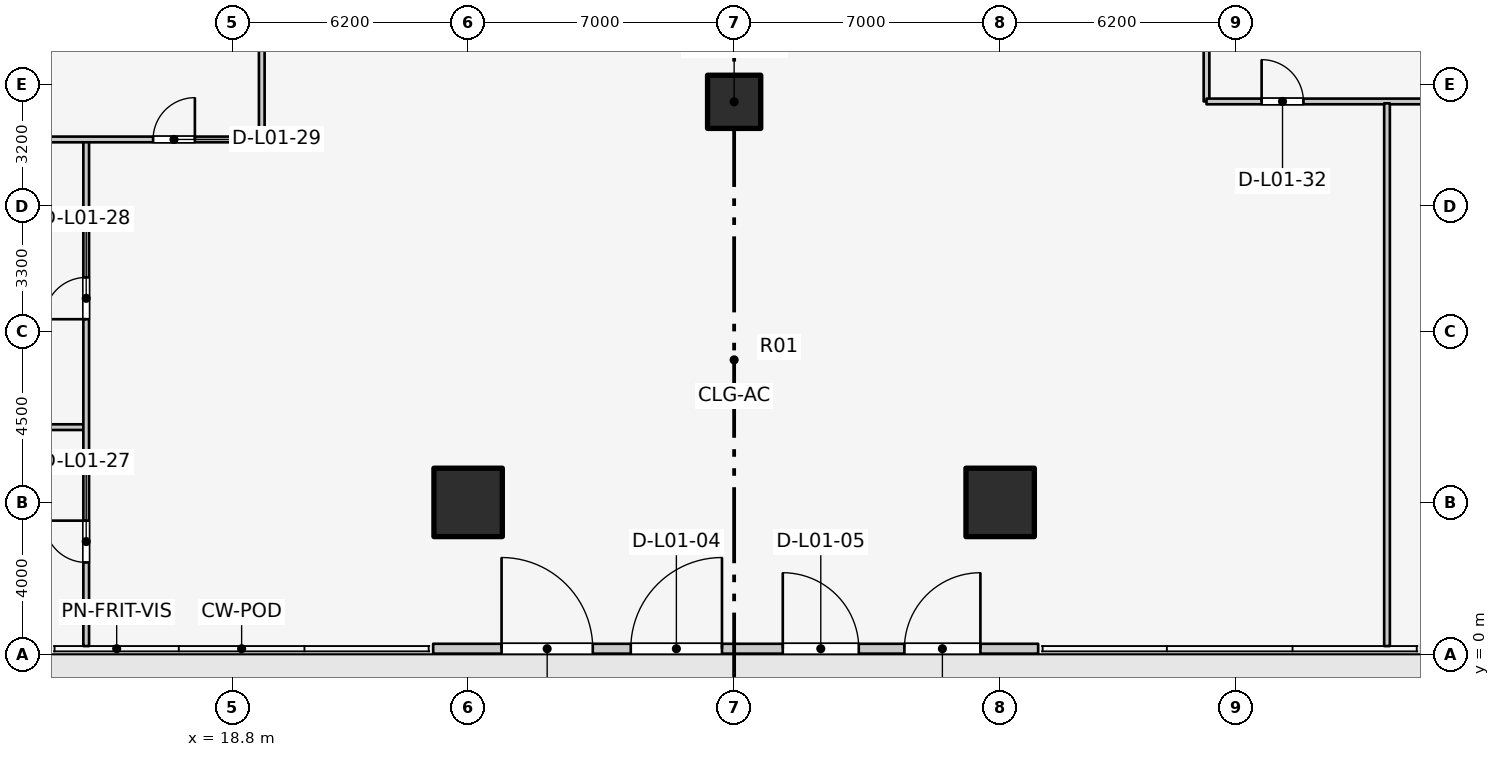
"""IFC4 building model, lengths in metres.
Left out: names, types, materials, properties, quantities, classifications, styles, units other than length and angle.
Written with IfcOpenShell. Run it as: python <this file> out.ifc"""

import sys

from ifc_helpers import new_model, si_unit, direction, frame, frame_2d, origin, origin_2d, place, context, subcontext, project, spatial, rectangle, extrude, element, fill, save


model = new_model("IFC4")
c1 = context("Model", 3, precision=1e-05, world=origin(), true_north=direction((0.0, 1.0)))
c2 = subcontext(c1, "Body", "Model", "MODEL_VIEW")
j1 = project(units=[si_unit("LENGTHUNIT", "METRE"), si_unit("PLANEANGLEUNIT", "RADIAN")], contexts=[c1])
p1 = place(None, origin())
s1 = spatial("IfcSite", under=j1, at=p1, CompositionType="ELEMENT")
p2 = place(p1, origin())
s2 = spatial("IfcBuilding", under=s1, at=p2, CompositionType="ELEMENT")
p3 = place(p2, origin())
s3 = spatial("IfcBuildingStorey", under=s2, at=p3, CompositionType="ELEMENT", Elevation=0.0)
for number, where, z_axis, x_axis in (
    (1, (25.0, 4.0, 0.0), (0.0, 0.0, 1.0), (1.0, 0.0, 0.0)),
    (2, (39.0, 4.0, 0.0), (0.0, 0.0, 1.0), (1.0, 0.0, 0.0)),
):
    element("IfcColumn", number, at=place(p3, frame(where, z_axis=z_axis, x_axis=x_axis)), inside=s3, PredefinedType="COLUMN", context=c2, shape_type="SweptSolid", body=[
        extrude(rectangle(XDim=1.8, YDim=1.8, at=origin_2d()), origin(), (0.0, 0.0, 1.0), 4.6),
    ])
p4 = place(p3, frame((32.0, 14.54, 0.0), z_axis=(0.0, 0.0, 1.0), x_axis=(1.0, 0.0, 0.0)))
e3 = element("IfcColumn", 3, at=p4, inside=s3, PredefinedType="COLUMN", context=c2, shape_type="SweptSolid", body=[
    extrude(rectangle(XDim=1.4, YDim=1.4, at=origin_2d()), origin(), (0.0, 0.0, 1.0), 4.6),
])
p5 = place(p3, frame((24.08, 0.15, 0.0), z_axis=(0.0, 0.0, 1.0), x_axis=(1.0, 0.0, 0.0)))
e4 = element("IfcWall", 4, at=p5, inside=s3, PredefinedType="STANDARD", context=c2, shape_type="SweptSolid", body=[
    extrude(rectangle(XDim=15.92, YDim=0.26, at=frame_2d((7.96, 0.0))), origin(), (0.0, 0.0, 1.0), 4.28),
])
p6 = place(p5, frame((1.8, 0.0, 0.0)))
e5 = element("IfcOpeningElement", 5, at=p6, cuts=e4, PredefinedType="OPENING", context=c2, shape_type="SweptSolid", body=[
    extrude(rectangle(XDim=2.4, YDim=2.6, at=frame_2d((1.2, 1.3))), frame((0.0, 0.14, 0.0), z_axis=(0.0, -1.0, 0.0), x_axis=(1.0, 0.0, 0.0)), (0.0, 0.0, 1.0), 0.28),
])
p7 = place(p5, frame((5.2, 0.0, 0.0)))
e6 = element("IfcOpeningElement", 6, at=p7, cuts=e4, PredefinedType="OPENING", context=c2, shape_type="SweptSolid", body=[
    extrude(rectangle(XDim=2.4, YDim=2.6, at=frame_2d((1.2, 1.3))), frame((0.0, 0.14, 0.0), z_axis=(0.0, -1.0, 0.0), x_axis=(1.0, 0.0, 0.0)), (0.0, 0.0, 1.0), 0.28),
])
p8 = place(p5, frame((9.2, 0.0, 0.0)))
e7 = element("IfcOpeningElement", 7, at=p8, cuts=e4, PredefinedType="OPENING", context=c2, shape_type="SweptSolid", body=[
    extrude(rectangle(XDim=2.0, YDim=2.4, at=frame_2d((1.0, 1.2))), frame((0.0, 0.14, 0.0), z_axis=(0.0, -1.0, 0.0), x_axis=(1.0, 0.0, 0.0)), (0.0, 0.0, 1.0), 0.28),
])
p9 = place(p5, frame((12.4, 0.0, 0.0)))
e8 = element("IfcOpeningElement", 8, at=p9, cuts=e4, PredefinedType="OPENING", context=c2, shape_type="SweptSolid", body=[
    extrude(rectangle(XDim=2.0, YDim=2.4, at=frame_2d((1.0, 1.2))), frame((0.0, 0.14, 0.0), z_axis=(0.0, -1.0, 0.0), x_axis=(1.0, 0.0, 0.0)), (0.0, 0.0, 1.0), 0.28),
])
p10 = place(p3, frame((9.12, 5.98, 0.0), z_axis=(0.0, 0.0, 1.0), x_axis=(1.0, 0.0, 0.0)))
e9 = element("IfcWall", 9, at=p10, inside=s3, PredefinedType="PARTITIONING", context=c2, shape_type="SweptSolid", body=[
    extrude(rectangle(XDim=5.86, YDim=0.15, at=frame_2d((2.93, 0.0))), origin(), (0.0, 0.0, 1.0), 4.255),
])
p11 = place(p3, frame((14.95, 0.22, 0.0), z_axis=(0.0, 0.0, 1.0), x_axis=(0.0, 1.0, 0.0)))
e10 = element("IfcWall", 10, at=p11, inside=s3, PredefinedType="PARTITIONING", context=c2, shape_type="SweptSolid", body=[
    extrude(rectangle(XDim=13.36, YDim=0.15, at=frame_2d((6.68, 0.0))), origin(), (0.0, 0.0, 1.0), 3.3),
])
p12 = place(p11, frame((2.2, 0.0, 0.0)))
e11 = element("IfcOpeningElement", 11, at=p12, cuts=e10, PredefinedType="OPENING", context=c2, shape_type="SweptSolid", body=[
    extrude(rectangle(XDim=1.1, YDim=2.1, at=frame_2d((0.55, 1.05))), frame((0.0, 0.085, 0.0), z_axis=(0.0, -1.0, 0.0), x_axis=(1.0, 0.0, 0.0)), (0.0, 0.0, 1.0), 0.17),
])
p13 = place(p11, frame((8.6, 0.0, 0.0)))
e12 = element("IfcOpeningElement", 12, at=p13, cuts=e10, PredefinedType="OPENING", context=c2, shape_type="SweptSolid", body=[
    extrude(rectangle(XDim=1.1, YDim=2.1, at=frame_2d((0.55, 1.05))), frame((0.0, 0.085, 0.0), z_axis=(0.0, -1.0, 0.0), x_axis=(1.0, 0.0, 0.0)), (0.0, 0.0, 1.0), 0.17),
])
p14 = place(p3, frame((9.11, 13.55, 0.0), z_axis=(0.0, 0.0, 1.0), x_axis=(1.0, 0.0, 0.0)))
e13 = element("IfcWall", 13, at=p14, inside=s3, PredefinedType="PARTITIONING", context=c2, shape_type="SweptSolid", body=[
    extrude(rectangle(XDim=10.46, YDim=0.15, at=frame_2d((5.23, 0.0))), origin(), (0.0, 0.0, 1.0), 4.255),
])
p15 = place(p14, frame((7.6, 0.0, 0.0)))
e14 = element("IfcOpeningElement", 14, at=p15, cuts=e13, PredefinedType="OPENING", context=c2, shape_type="SweptSolid", body=[
    extrude(rectangle(XDim=1.1, YDim=2.1, at=frame_2d((0.55, 1.05))), frame((0.0, 0.085, 0.0), z_axis=(0.0, -1.0, 0.0), x_axis=(1.0, 0.0, 0.0)), (0.0, 0.0, 1.0), 0.17),
])
p16 = place(p3, frame((19.57, 13.55, 0.0), z_axis=(0.0, 0.0, 1.0), x_axis=(0.0, 1.0, 0.0)))
e15 = element("IfcWall", 15, at=p16, inside=s3, PredefinedType="PARTITIONING", context=c2, shape_type="SweptSolid", body=[
    extrude(rectangle(XDim=3.47, YDim=0.15, at=frame_2d((1.735, 0.0))), origin(), (0.0, 0.0, 1.0), 4.255),
])
p17 = place(p3, frame((44.43, 14.55, 0.0), z_axis=(0.0, 0.0, 1.0), x_axis=(0.0, 1.0, 0.0)))
e16 = element("IfcWall", 16, at=p17, inside=s3, PredefinedType="PARTITIONING", context=c2, shape_type="SweptSolid", body=[
    extrude(rectangle(XDim=2.47, YDim=0.15, at=frame_2d((1.235, 0.0))), origin(), (0.0, 0.0, 1.0), 4.255),
])
p18 = place(p3, frame((44.43, 14.55, 0.0), z_axis=(0.0, 0.0, 1.0), x_axis=(1.0, 0.0, 0.0)))
e17 = element("IfcWall", 17, at=p18, inside=s3, PredefinedType="PARTITIONING", context=c2, shape_type="SweptSolid", body=[
    extrude(rectangle(XDim=19.35, YDim=0.15, at=frame_2d((9.675, 0.0))), origin(), (0.0, 0.0, 1.0), 3.3),
])
p19 = place(p18, frame((1.45, 0.0, 0.0)))
e18 = element("IfcOpeningElement", 18, at=p19, cuts=e17, PredefinedType="OPENING", context=c2, shape_type="SweptSolid", body=[
    extrude(rectangle(XDim=1.1, YDim=2.1, at=frame_2d((0.55, 1.05))), frame((0.0, 0.085, 0.0), z_axis=(0.0, -1.0, 0.0), x_axis=(1.0, 0.0, 0.0)), (0.0, 0.0, 1.0), 0.17),
])
p20 = place(p18, frame((6.85, 0.0, 0.0)))
e19 = element("IfcOpeningElement", 19, at=p20, cuts=e17, PredefinedType="OPENING", context=c2, shape_type="SweptSolid", body=[
    extrude(rectangle(XDim=1.1, YDim=2.1, at=frame_2d((0.55, 1.05))), frame((0.0, 0.085, 0.0), z_axis=(0.0, -1.0, 0.0), x_axis=(1.0, 0.0, 0.0)), (0.0, 0.0, 1.0), 0.17),
])
p21 = place(p18, frame((15.85, 0.0, 0.0)))
e20 = element("IfcOpeningElement", 20, at=p21, cuts=e17, PredefinedType="OPENING", context=c2, shape_type="SweptSolid", body=[
    extrude(rectangle(XDim=1.1, YDim=2.1, at=frame_2d((0.55, 1.05))), frame((0.0, 0.085, 0.0), z_axis=(0.0, -1.0, 0.0), x_axis=(1.0, 0.0, 0.0)), (0.0, 0.0, 1.0), 0.17),
])
p22 = place(p3, frame((49.18, 0.22, 0.0), z_axis=(0.0, 0.0, 1.0), x_axis=(0.0, 1.0, 0.0)))
e21 = element("IfcWall", 21, at=p22, inside=s3, PredefinedType="PARTITIONING", context=c2, shape_type="SweptSolid", body=[
    extrude(rectangle(XDim=14.28, YDim=0.15, at=frame_2d((7.14, 0.0))), origin(), (0.0, 0.0, 1.0), 3.3),
])
p23 = place(p6, frame((2.4, 0.0, 0.0), z_axis=(0.0, 0.0, 1.0), x_axis=(-1.0, 0.0, 0.0)))
e22 = element("IfcDoor", 22, at=p23, inside=s3, OperationType="SINGLE_SWING_LEFT", PredefinedType="DOOR", context=c2, shape_type="SweptSolid", body=[
    extrude(rectangle(XDim=2.4, YDim=2.6, at=frame_2d((1.2, 1.3))), frame((0.0, 0.025, 0.0), z_axis=(0.0, -1.0, 0.0), x_axis=(1.0, 0.0, 0.0)), (0.0, 0.0, 1.0), 0.05),
])
fill(e5, e22)
p24 = place(p7, frame((2.4, 0.0, 0.0), z_axis=(0.0, 0.0, 1.0), x_axis=(-1.0, 0.0, 0.0)))
e23 = element("IfcDoor", 23, at=p24, inside=s3, OperationType="SINGLE_SWING_RIGHT", PredefinedType="DOOR", context=c2, shape_type="SweptSolid", body=[
    extrude(rectangle(XDim=2.4, YDim=2.6, at=frame_2d((1.2, 1.3))), frame((0.0, 0.025, 0.0), z_axis=(0.0, -1.0, 0.0), x_axis=(1.0, 0.0, 0.0)), (0.0, 0.0, 1.0), 0.05),
])
fill(e6, e23)
p25 = place(p8, frame((2.0, 0.0, 0.0), z_axis=(0.0, 0.0, 1.0), x_axis=(-1.0, 0.0, 0.0)))
e24 = element("IfcDoor", 24, at=p25, inside=s3, OperationType="SINGLE_SWING_LEFT", PredefinedType="DOOR", context=c2, shape_type="SweptSolid", body=[
    extrude(rectangle(XDim=2.0, YDim=2.4, at=frame_2d((1.0, 1.2))), frame((0.0, 0.025, 0.0), z_axis=(0.0, -1.0, 0.0), x_axis=(1.0, 0.0, 0.0)), (0.0, 0.0, 1.0), 0.05),
])
fill(e7, e24)
p26 = place(p9, frame((2.0, 0.0, 0.0), z_axis=(0.0, 0.0, 1.0), x_axis=(-1.0, 0.0, 0.0)))
e25 = element("IfcDoor", 25, at=p26, inside=s3, OperationType="SINGLE_SWING_RIGHT", PredefinedType="DOOR", context=c2, shape_type="SweptSolid", body=[
    extrude(rectangle(XDim=2.0, YDim=2.4, at=frame_2d((1.0, 1.2))), frame((0.0, 0.025, 0.0), z_axis=(0.0, -1.0, 0.0), x_axis=(1.0, 0.0, 0.0)), (0.0, 0.0, 1.0), 0.05),
])
fill(e8, e25)
p27 = place(p12, origin())
e26 = element("IfcDoor", 26, at=p27, inside=s3, OperationType="SINGLE_SWING_RIGHT", PredefinedType="DOOR", context=c2, shape_type="SweptSolid", body=[
    extrude(rectangle(XDim=1.1, YDim=2.1, at=frame_2d((0.55, 1.05))), frame((0.0, 0.025, 0.0), z_axis=(0.0, -1.0, 0.0), x_axis=(1.0, 0.0, 0.0)), (0.0, 0.0, 1.0), 0.05),
])
fill(e11, e26)
p28 = place(p13, origin())
e27 = element("IfcDoor", 27, at=p28, inside=s3, OperationType="SINGLE_SWING_LEFT", PredefinedType="DOOR", context=c2, shape_type="SweptSolid", body=[
    extrude(rectangle(XDim=1.1, YDim=2.1, at=frame_2d((0.55, 1.05))), frame((0.0, 0.025, 0.0), z_axis=(0.0, -1.0, 0.0), x_axis=(1.0, 0.0, 0.0)), (0.0, 0.0, 1.0), 0.05),
])
fill(e12, e27)
p29 = place(p15, origin())
e28 = element("IfcDoor", 28, at=p29, inside=s3, OperationType="SINGLE_SWING_RIGHT", PredefinedType="DOOR", context=c2, shape_type="SweptSolid", body=[
    extrude(rectangle(XDim=1.1, YDim=2.1, at=frame_2d((0.55, 1.05))), frame((0.0, 0.025, 0.0), z_axis=(0.0, -1.0, 0.0), x_axis=(1.0, 0.0, 0.0)), (0.0, 0.0, 1.0), 0.05),
])
fill(e14, e28)
p30 = place(p19, origin())
e29 = element("IfcDoor", 29, at=p30, inside=s3, OperationType="SINGLE_SWING_LEFT", PredefinedType="DOOR", context=c2, shape_type="SweptSolid", body=[
    extrude(rectangle(XDim=1.1, YDim=2.1, at=frame_2d((0.55, 1.05))), frame((0.0, 0.025, 0.0), z_axis=(0.0, -1.0, 0.0), x_axis=(1.0, 0.0, 0.0)), (0.0, 0.0, 1.0), 0.05),
])
fill(e18, e29)
save(model, sys.argv[1])
